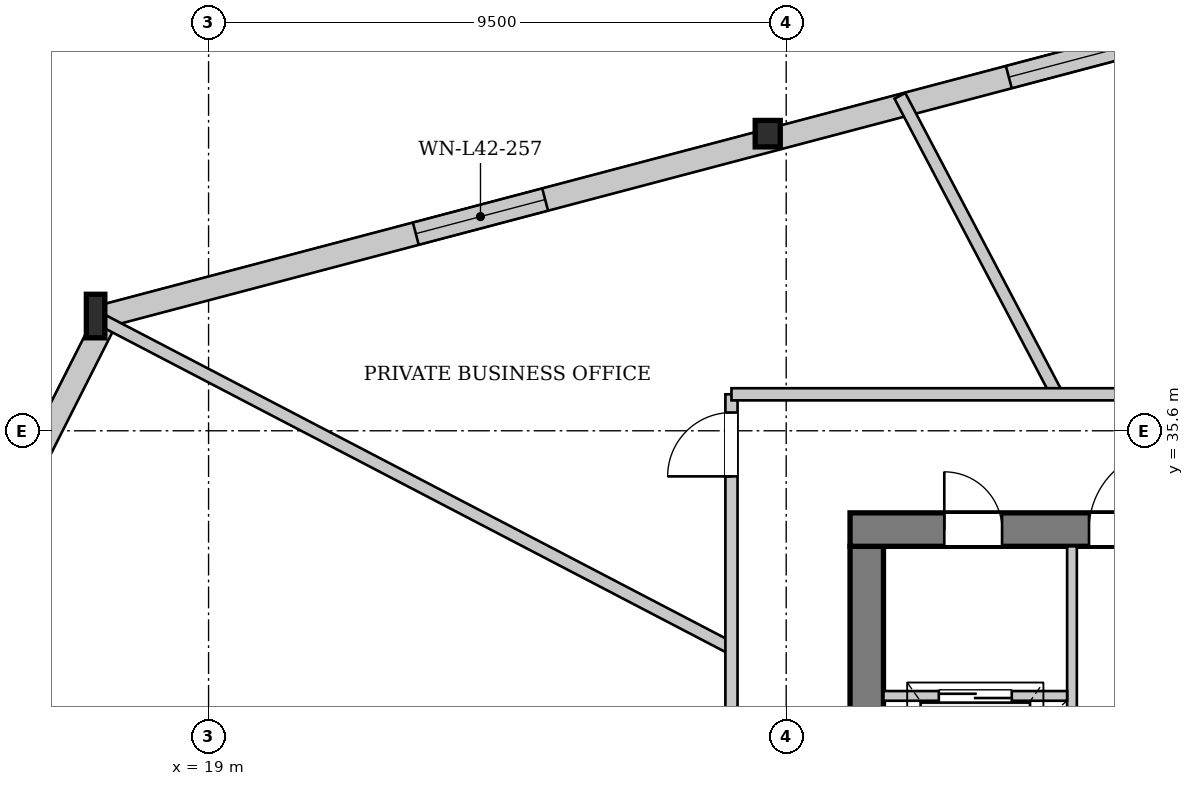
"""IFC4 building model, lengths in metres.
Left out: names, types, materials, properties, quantities, classifications, styles, units other than length and angle.
Written with IfcOpenShell. Run it as: python <this file> out.ifc"""

import sys

from ifc_helpers import new_model, si_unit, direction, frame, frame_2d, origin, origin_2d, place, context, subcontext, project, spatial, rectangle, i_section, extrude, source, transform, mapped, element, fill, save


model = new_model("IFC4")
c1 = context("Model", 3, precision=1e-05, world=origin(), true_north=direction((0.0, 1.0)))
c2 = subcontext(c1, "Body", "Model", "MODEL_VIEW")
j1 = project(units=[si_unit("LENGTHUNIT", "METRE"), si_unit("PLANEANGLEUNIT", "RADIAN")], contexts=[c1])
p1 = place(None, origin())
s1 = spatial("IfcSite", under=j1, at=p1, CompositionType="ELEMENT")
p2 = place(p1, origin())
s2 = spatial("IfcBuilding", under=s1, at=p2, CompositionType="ELEMENT")
p3 = place(p2, frame((0.0, 0.0, 160.8)))
s3 = spatial("IfcBuildingStorey", under=s2, at=p3, CompositionType="ELEMENT", Elevation=160.8)
m1 = source(origin(), c2, "Body", "SweptSolid", [
    extrude(i_section(OverallWidth=0.412, OverallDepth=0.435, WebThickness=0.031, FlangeThickness=0.05, at=origin_2d()), origin(), (0.0, 0.0, 1.0), 3.398),
])
p4 = place(p3, frame((28.3, 40.593, 0.0), z_axis=(-0.061069254027, -0.062937254738, 0.99614730245), x_axis=(0.717677026067, -0.696376109768, 0.0)))
e1 = element("IfcColumn", 1, at=p4, inside=s3, PredefinedType="COLUMN", context=c2, shape_type="MappedRepresentation", body=[
    mapped(m1, transform((0.0, 0.0, 0.0), x_axis=(1.0, 0.0, 0.0), y_axis=(0.0, 1.0, 0.0), z_axis=(0.0, 0.0, 1.0), scale=1.0)),
])
m2 = source(origin(), c2, "Body", "SweptSolid", [
    extrude(i_section(OverallWidth=0.304, OverallDepth=0.716, WebThickness=0.021, FlangeThickness=0.04, at=origin_2d()), origin(), (0.0, 0.0, 1.0), 3.408),
])
p5 = place(p3, frame((17.218, 37.667, 0.0), z_axis=(-0.044563769491, -0.105964332922, 0.993370842434), x_axis=(0.92179953957, -0.38766687871, 0.0)))
e2 = element("IfcColumn", 2, at=p5, inside=s3, PredefinedType="COLUMN", context=c2, shape_type="MappedRepresentation", body=[
    mapped(m2, transform((0.0, 0.0, 0.0), x_axis=(1.0, 0.0, 0.0), y_axis=(0.0, 1.0, 0.0), z_axis=(0.0, 0.0, 1.0), scale=1.0)),
])
p6 = place(p3, frame((21.184, 16.555, 0.0), z_axis=(0.0, 0.0, 1.0), x_axis=(-0.332843624825, 0.942982036634, 0.0)))
e3 = element("IfcWall", 3, at=p6, inside=s3, PredefinedType="SOLIDWALL", context=c2, shape_type="SweptSolid", body=[
    extrude(rectangle(XDim=17.927, YDim=0.32, at=frame_2d((8.964, 0.0))), origin(), (0.0, 0.0, 1.0), 2.722),
])
p7 = place(p6, frame((4.987, 0.0, 0.0)))
e4 = element("IfcOpeningElement", 4, at=p7, cuts=e3, PredefinedType="OPENING", context=c2, shape_type="SweptSolid", body=[
    extrude(rectangle(XDim=1.5, YDim=2.3, at=frame_2d((0.75, 1.15))), frame((0.0, 0.17, 0.0), z_axis=(0.0, -1.0, 0.0), x_axis=(1.0, 0.0, 0.0)), (0.0, 0.0, 1.0), 0.34),
])
p8 = place(p6, frame((11.966, 0.0, 0.252)))
e5 = element("IfcOpeningElement", 5, at=p8, cuts=e3, PredefinedType="OPENING", context=c2, shape_type="SweptSolid", body=[
    extrude(rectangle(XDim=2.6, YDim=2.35, at=frame_2d((1.3, 1.175))), frame((0.0, 0.17, 0.0), z_axis=(0.0, -1.0, 0.0), x_axis=(1.0, 0.0, 0.0)), (0.0, 0.0, 1.0), 0.34),
])
p9 = place(p3, frame((15.236, 33.321, 0.0), z_axis=(0.0, 0.0, 1.0), x_axis=(0.450831311433, 0.892609169028, 0.0)))
e6 = element("IfcWall", 6, at=p9, inside=s3, PredefinedType="SOLIDWALL", context=c2, shape_type="SweptSolid", body=[
    extrude(rectangle(XDim=4.773, YDim=0.38, at=frame_2d((2.387, 0.0))), origin(), (0.0, 0.0, 1.0), 2.722),
])
p10 = place(p3, frame((17.267, 37.484, 0.0), z_axis=(0.0, 0.0, 1.0), x_axis=(0.966875026681, 0.255250235613, 0.0)))
e7 = element("IfcWall", 7, at=p10, inside=s3, PredefinedType="SOLIDWALL", context=c2, shape_type="SweptSolid", body=[
    extrude(rectangle(XDim=22.923, YDim=0.38, at=frame_2d((11.461, 0.0))), origin(), (0.0, 0.0, 1.0), 2.722),
])
p11 = place(p10, frame((5.318, 0.0, 0.352)))
e8 = element("IfcOpeningElement", 8, at=p11, cuts=e7, PredefinedType="OPENING", context=c2, shape_type="SweptSolid", body=[
    extrude(rectangle(XDim=2.2, YDim=2.25, at=frame_2d((1.1, 1.125))), frame((0.0, 0.2, 0.0), z_axis=(0.0, -1.0, 0.0), x_axis=(1.0, 0.0, 0.0)), (0.0, 0.0, 1.0), 0.4),
])
p12 = place(p10, frame((15.405, 0.0, 0.352)))
e9 = element("IfcOpeningElement", 9, at=p12, cuts=e7, PredefinedType="OPENING", context=c2, shape_type="SweptSolid", body=[
    extrude(rectangle(XDim=2.2, YDim=2.25, at=frame_2d((1.1, 1.125))), frame((0.0, 0.2, 0.0), z_axis=(0.0, -1.0, 0.0), x_axis=(1.0, 0.0, 0.0)), (0.0, 0.0, 1.0), 0.4),
])
p13 = place(p3, frame((29.825, 19.5, 0.0), z_axis=(0.0, 0.0, 1.0), x_axis=(0.0, 1.0, 0.0)))
e10 = element("IfcWall", 10, at=p13, inside=s3, PredefinedType="SHEAR", context=c2, shape_type="SweptSolid", body=[
    extrude(rectangle(XDim=14.2, YDim=0.55, at=frame_2d((7.1, 0.0))), origin(), (0.0, 0.0, 1.0), 3.33),
])
p14 = place(p13, frame((7.42, 0.0, 0.0)))
e11 = element("IfcOpeningElement", 11, at=p14, cuts=e10, PredefinedType="OPENING", context=c2, shape_type="SweptSolid", body=[
    extrude(rectangle(XDim=1.6, YDim=2.2, at=frame_2d((0.8, 1.1))), frame((0.0, 0.285, 0.0), z_axis=(0.0, -1.0, 0.0), x_axis=(1.0, 0.0, 0.0)), (0.0, 0.0, 1.0), 0.57),
])
p15 = place(p3, frame((29.55, 33.975, 0.0), z_axis=(0.0, 0.0, 1.0), x_axis=(1.0, 0.0, 0.0)))
e12 = element("IfcWall", 12, at=p15, inside=s3, PredefinedType="SHEAR", context=c2, shape_type="SweptSolid", body=[
    extrude(rectangle(XDim=16.9, YDim=0.55, at=frame_2d((8.45, 0.0))), origin(), (0.0, 0.0, 1.0), 3.33),
])
p16 = place(p15, frame((1.55, 0.0, 0.0)))
e13 = element("IfcOpeningElement", 13, at=p16, cuts=e12, PredefinedType="OPENING", context=c2, shape_type="SweptSolid", body=[
    extrude(rectangle(XDim=0.95, YDim=2.1, at=frame_2d((0.475, 1.05))), frame((0.0, 0.285, 0.0), z_axis=(0.0, -1.0, 0.0), x_axis=(1.0, 0.0, 0.0)), (0.0, 0.0, 1.0), 0.57),
])
p17 = place(p15, frame((3.93, 0.0, 0.0)))
e14 = element("IfcOpeningElement", 14, at=p17, cuts=e12, PredefinedType="OPENING", context=c2, shape_type="SweptSolid", body=[
    extrude(rectangle(XDim=1.32, YDim=2.2, at=frame_2d((0.66, 1.1))), frame((0.0, 0.285, 0.0), z_axis=(0.0, -1.0, 0.0), x_axis=(1.0, 0.0, 0.0)), (0.0, 0.0, 1.0), 0.57),
])
p18 = place(p3, frame((33.2, 28.44, 0.0), z_axis=(0.0, 0.0, 1.0), x_axis=(0.0, 1.0, 0.0)))
e15 = element("IfcWall", 15, at=p18, inside=s3, PredefinedType="PARTITIONING", context=c2, shape_type="SweptSolid", body=[
    extrude(rectangle(XDim=5.26, YDim=0.16, at=frame_2d((2.63, 0.0))), origin(), (0.0, 0.0, 1.0), 3.33),
])
p19 = place(p3, frame((30.1, 31.24, 0.0), z_axis=(0.0, 0.0, 1.0), x_axis=(1.0, 0.0, 0.0)))
e16 = element("IfcWall", 16, at=p19, inside=s3, PredefinedType="PARTITIONING", context=c2, shape_type="SweptSolid", body=[
    extrude(rectangle(XDim=3.02, YDim=0.16, at=frame_2d((1.51, 0.0))), origin(), (0.0, 0.0, 1.0), 3.33),
])
p20 = place(p19, frame((0.91, 0.0, 0.0)))
e17 = element("IfcOpeningElement", 17, at=p20, cuts=e16, PredefinedType="OPENING", context=c2, shape_type="SweptSolid", body=[
    extrude(rectangle(XDim=1.2, YDim=2.2, at=frame_2d((0.6, 1.1))), frame((0.0, 0.09, 0.0), z_axis=(0.0, -1.0, 0.0), x_axis=(1.0, 0.0, 0.0)), (0.0, 0.0, 1.0), 0.18),
])
p21 = place(p3, frame((32.951, 36.2, 0.0), z_axis=(0.0, 0.0, 1.0), x_axis=(-0.465485147259, 0.885055691853, 0.0)))
e18 = element("IfcWall", 18, at=p21, inside=s3, PredefinedType="PARTITIONING", context=c2, shape_type="SweptSolid", body=[
    extrude(rectangle(XDim=5.546, YDim=0.2, at=frame_2d((2.773, 0.0))), origin(), (0.0, 0.0, 1.0), 3.33),
])
p22 = place(p3, frame((27.6, 32.023, 0.0), z_axis=(0.0, 0.0, 1.0), x_axis=(-0.886710795581, 0.462324523468, 0.0)))
e19 = element("IfcWall", 19, at=p22, inside=s3, PredefinedType="PARTITIONING", context=c2, shape_type="SweptSolid", body=[
    extrude(rectangle(XDim=11.783, YDim=0.2, at=frame_2d((5.892, 0.0))), origin(), (0.0, 0.0, 1.0), 2.925),
])
p23 = place(p3, frame((27.6, 17.0, 0.0), z_axis=(0.0, 0.0, 1.0), x_axis=(0.0, 1.0, 0.0)))
e20 = element("IfcWall", 20, at=p23, inside=s3, PredefinedType="PARTITIONING", context=c2, shape_type="SweptSolid", body=[
    extrude(rectangle(XDim=19.2, YDim=0.2, at=frame_2d((9.6, 0.0))), origin(), (0.0, 0.0, 1.0), 3.33),
])
p24 = place(p23, frame((17.85, 0.0, 0.0)))
e21 = element("IfcOpeningElement", 21, at=p24, cuts=e20, PredefinedType="OPENING", context=c2, shape_type="SweptSolid", body=[
    extrude(rectangle(XDim=1.05, YDim=2.2, at=frame_2d((0.525, 1.1))), frame((0.0, 0.11, 0.0), z_axis=(0.0, -1.0, 0.0), x_axis=(1.0, 0.0, 0.0)), (0.0, 0.0, 1.0), 0.22),
])
p25 = place(p23, frame((11.151, 0.0, 0.0)))
e22 = element("IfcOpeningElement", 22, at=p25, cuts=e20, PredefinedType="OPENING", context=c2, shape_type="SweptSolid", body=[
    extrude(rectangle(XDim=1.05, YDim=2.2, at=frame_2d((0.525, 1.1))), frame((0.0, 0.11, 0.0), z_axis=(0.0, -1.0, 0.0), x_axis=(1.0, 0.0, 0.0)), (0.0, 0.0, 1.0), 0.22),
])
p26 = place(p23, frame((3.147, 0.0, 0.0)))
e23 = element("IfcOpeningElement", 23, at=p26, cuts=e20, PredefinedType="OPENING", context=c2, shape_type="SweptSolid", body=[
    extrude(rectangle(XDim=1.05, YDim=2.2, at=frame_2d((0.525, 1.1))), frame((0.0, 0.11, 0.0), z_axis=(0.0, -1.0, 0.0), x_axis=(1.0, 0.0, 0.0)), (0.0, 0.0, 1.0), 0.22),
])
p27 = place(p3, frame((27.6, 36.2, 0.0), z_axis=(0.0, 0.0, 1.0), x_axis=(1.0, 0.0, 0.0)))
e24 = element("IfcWall", 24, at=p27, inside=s3, PredefinedType="PARTITIONING", context=c2, shape_type="SweptSolid", body=[
    extrude(rectangle(XDim=13.4, YDim=0.2, at=frame_2d((6.7, 0.0))), origin(), (0.0, 0.0, 1.0), 3.33),
])
p28 = place(p27, frame((7.461, 0.0, 0.0)))
e25 = element("IfcOpeningElement", 25, at=p28, cuts=e24, PredefinedType="OPENING", context=c2, shape_type="SweptSolid", body=[
    extrude(rectangle(XDim=1.05, YDim=2.2, at=frame_2d((0.525, 1.1))), frame((0.0, 0.11, 0.0), z_axis=(0.0, -1.0, 0.0), x_axis=(1.0, 0.0, 0.0)), (0.0, 0.0, 1.0), 0.22),
])
m3 = source(origin(), c2, "Body", "SweptSolid", [
    extrude(rectangle(XDim=2.2, YDim=2.25, at=frame_2d((1.1, 1.125))), frame((0.0, 0.03, 0.0), z_axis=(0.0, -1.0, 0.0), x_axis=(1.0, 0.0, 0.0)), (0.0, 0.0, 1.0), 0.06),
])
p29 = place(p11, origin())
e26 = element("IfcWindow", 26, at=p29, inside=s3, PartitioningType="SINGLE_PANEL", PredefinedType="WINDOW", context=c2, shape_type="MappedRepresentation", body=[
    mapped(m3, transform((0.0, 0.0, 0.0), x_axis=(1.0, 0.0, 0.0), y_axis=(0.0, 1.0, 0.0), z_axis=(0.0, 0.0, 1.0), scale=1.0)),
])
fill(e8, e26)
p30 = place(p12, origin())
e27 = element("IfcWindow", 27, at=p30, inside=s3, PartitioningType="SINGLE_PANEL", PredefinedType="WINDOW", context=c2, shape_type="MappedRepresentation", body=[
    mapped(m3, transform((0.0, 0.0, 0.0), x_axis=(1.0, 0.0, 0.0), y_axis=(0.0, 1.0, 0.0), z_axis=(0.0, 0.0, 1.0), scale=1.0)),
])
fill(e9, e27)
m4 = source(origin(), c2, "Body", "SweptSolid", [
    extrude(rectangle(XDim=0.95, YDim=2.1, at=frame_2d((0.475, 1.05))), frame((0.0, 0.025, 0.0), z_axis=(0.0, -1.0, 0.0), x_axis=(1.0, 0.0, 0.0)), (0.0, 0.0, 1.0), 0.05),
])
p31 = place(p16, origin())
e28 = element("IfcDoor", 28, at=p31, inside=s3, OperationType="SINGLE_SWING_LEFT", PredefinedType="DOOR", context=c2, shape_type="MappedRepresentation", body=[
    mapped(m4, transform((0.0, 0.0, 0.0), x_axis=(1.0, 0.0, 0.0), y_axis=(0.0, 1.0, 0.0), z_axis=(0.0, 0.0, 1.0), scale=1.0)),
])
fill(e13, e28)
m5 = source(origin(), c2, "Body", "SweptSolid", [
    extrude(rectangle(XDim=1.32, YDim=2.2, at=frame_2d((0.66, 1.1))), frame((0.0, 0.025, 0.0), z_axis=(0.0, -1.0, 0.0), x_axis=(1.0, 0.0, 0.0)), (0.0, 0.0, 1.0), 0.05),
])
p32 = place(p17, origin())
e29 = element("IfcDoor", 29, at=p32, inside=s3, OperationType="SINGLE_SWING_RIGHT", PredefinedType="DOOR", context=c2, shape_type="MappedRepresentation", body=[
    mapped(m5, transform((0.0, 0.0, 0.0), x_axis=(1.0, 0.0, 0.0), y_axis=(0.0, 1.0, 0.0), z_axis=(0.0, 0.0, 1.0), scale=1.0)),
])
fill(e14, e29)
m6 = source(origin(), c2, "Body", "SweptSolid", [
    extrude(rectangle(XDim=1.2, YDim=2.2, at=frame_2d((0.6, 1.1))), frame((0.0, 0.025, 0.0), z_axis=(0.0, -1.0, 0.0), x_axis=(1.0, 0.0, 0.0)), (0.0, 0.0, 1.0), 0.05),
])
p33 = place(p20, origin())
e30 = element("IfcDoor", 30, at=p33, inside=s3, OperationType="DOUBLE_DOOR_SLIDING", PredefinedType="DOOR", context=c2, shape_type="MappedRepresentation", body=[
    mapped(m6, transform((0.0, 0.0, 0.0), x_axis=(1.0, 0.0, 0.0), y_axis=(0.0, 1.0, 0.0), z_axis=(0.0, 0.0, 1.0), scale=1.0)),
])
fill(e17, e30)
m7 = source(origin(), c2, "Body", "SweptSolid", [
    extrude(rectangle(XDim=1.05, YDim=2.2, at=frame_2d((0.525, 1.1))), frame((0.0, 0.025, 0.0), z_axis=(0.0, -1.0, 0.0), x_axis=(1.0, 0.0, 0.0)), (0.0, 0.0, 1.0), 0.05),
])
p34 = place(p24, origin())
e31 = element("IfcDoor", 31, at=p34, inside=s3, OperationType="SINGLE_SWING_LEFT", PredefinedType="DOOR", context=c2, shape_type="MappedRepresentation", body=[
    mapped(m7, transform((0.0, 0.0, 0.0), x_axis=(1.0, 0.0, 0.0), y_axis=(0.0, 1.0, 0.0), z_axis=(0.0, 0.0, 1.0), scale=1.0)),
])
fill(e21, e31)
save(model, sys.argv[1])
